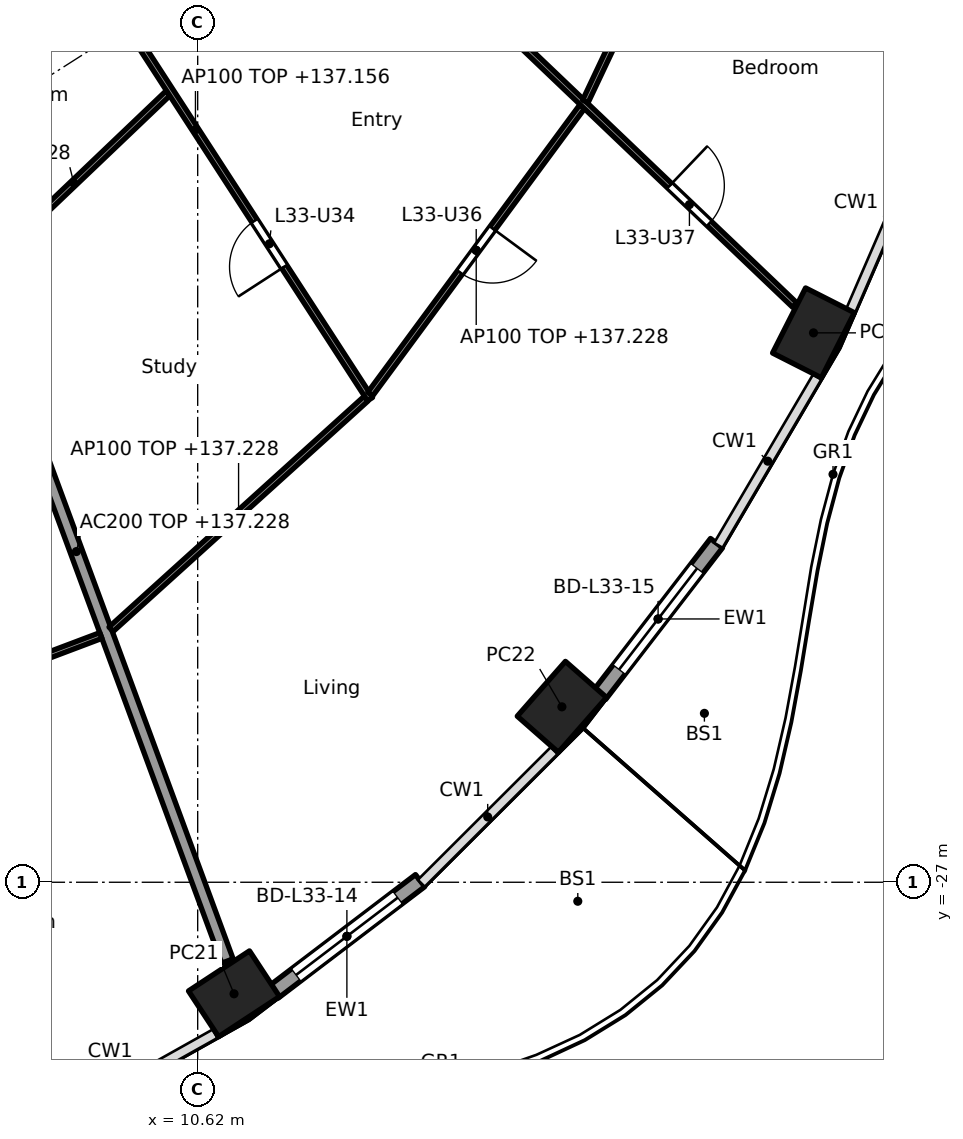
"""IFC4 building model, lengths in metres.
Left out: names, types, materials, properties, quantities, classifications, styles, units other than length and angle.
Written with IfcOpenShell. Run it as: python <this file> out.ifc"""

import sys

from ifc_helpers import new_model, si_unit, direction, frame, frame_2d, origin, origin_2d, place, context, subcontext, project, spatial, rectangle, hollow_rectangle, extrude, element, fill, save


model = new_model("IFC4")
c1 = context("Model", 3, precision=1e-05, world=origin(), true_north=direction((0.0, 1.0)))
c2 = subcontext(c1, "Body", "Model", "MODEL_VIEW")
j1 = project(units=[si_unit("LENGTHUNIT", "METRE"), si_unit("PLANEANGLEUNIT", "RADIAN")], contexts=[c1])
p1 = place(None, origin())
s1 = spatial("IfcSite", under=j1, at=p1, CompositionType="ELEMENT")
p2 = place(p1, origin())
s2 = spatial("IfcBuilding", under=s1, at=p2, CompositionType="ELEMENT")
p3 = place(p2, frame((0.0, 0.0, 134.4)))
s3 = spatial("IfcBuildingStorey", under=s2, at=p3, CompositionType="ELEMENT", Elevation=134.4)
for number, where, z_axis, x_axis in (
    (1, (11.218, -28.834, 0.0), (0.0, 0.0, 1.0), (0.836, 0.549, 0.0)),
    (2, (16.61, -24.115, 0.0), (0.0, 0.0, 1.0), (0.66, 0.751, 0.0)),
    (3, (20.747, -17.965, 0.0), (0.0, 0.0, 1.0), (0.452, 0.892, 0.0)),
):
    element("IfcColumn", number, at=place(p3, frame(where, z_axis=z_axis, x_axis=x_axis)), inside=s3, PredefinedType="COLUMN", context=c2, shape_type="SweptSolid", body=[
        extrude(hollow_rectangle(XDim=1.2, YDim=0.9, WallThickness=0.04, at=origin_2d()), origin(), (0.0, 0.0, 1.0), 3.7),
    ])
p4 = place(p3, frame((14.278, -26.973, 0.0), z_axis=(0.0, 0.0, 1.0), x_axis=(-0.796022231079, -0.605267385233, 0.0)))
e4 = element("IfcWall", 4, at=p4, inside=s3, PredefinedType="SOLIDWALL", context=c2, shape_type="SweptSolid", body=[
    extrude(rectangle(XDim=3.026, YDim=0.25, at=frame_2d((1.513, 0.0))), origin(), (0.0, 0.0, 1.0), 3.44),
])
p5 = place(p4, frame((0.463, 0.0, 0.0)))
e5 = element("IfcOpeningElement", 5, at=p5, cuts=e4, PredefinedType="OPENING", context=c2, shape_type="SweptSolid", body=[
    extrude(rectangle(XDim=2.1, YDim=2.4, at=frame_2d((1.05, 1.2))), frame((0.0, 0.135, 0.0), z_axis=(0.0, -1.0, 0.0), x_axis=(1.0, 0.0, 0.0)), (0.0, 0.0, 1.0), 0.27),
])
p6 = place(p3, frame((19.153, -21.423, 0.0), z_axis=(0.0, 0.0, 1.0), x_axis=(-0.610429847179, -0.792070326217, 0.0)))
e6 = element("IfcWall", 6, at=p6, inside=s3, PredefinedType="SOLIDWALL", context=c2, shape_type="SweptSolid", body=[
    extrude(rectangle(XDim=3.149, YDim=0.25, at=frame_2d((1.575, 0.0))), origin(), (0.0, 0.0, 1.0), 3.44),
])
p7 = place(p6, frame((0.525, 0.0, 0.0)))
e7 = element("IfcOpeningElement", 7, at=p7, cuts=e6, PredefinedType="OPENING", context=c2, shape_type="SweptSolid", body=[
    extrude(rectangle(XDim=2.1, YDim=2.4, at=frame_2d((1.05, 1.2))), frame((0.0, 0.135, 0.0), z_axis=(0.0, -1.0, 0.0), x_axis=(1.0, 0.0, 0.0)), (0.0, 0.0, 1.0), 0.27),
])
p8 = place(p3, frame((6.14, -14.829, 0.0), z_axis=(0.0, 0.0, 1.0), x_axis=(0.346169582481, -0.938171956608, 0.0)))
e8 = element("IfcWall", 8, at=p8, inside=s3, PredefinedType="PARTITIONING", context=c2, shape_type="SweptSolid", body=[
    extrude(rectangle(XDim=14.354, YDim=0.2, at=frame_2d((7.177, 0.0))), origin(), (0.0, 0.0, 1.0), 2.828),
])
p9 = place(p3, frame((4.178, -24.773, 0.0), z_axis=(0.0, 0.0, 1.0), x_axis=(0.935583811437, 0.353104703702, 0.0)))
e9 = element("IfcWall", 9, at=p9, inside=s3, PredefinedType="PARTITIONING", context=c2, shape_type="SweptSolid", body=[
    extrude(rectangle(XDim=5.184, YDim=0.1, at=frame_2d((2.592, 0.0))), origin(), (0.0, 0.0, 1.0), 2.828),
])
p10 = place(p3, frame((7.032, -16.98, 0.0), z_axis=(0.0, 0.0, 1.0), x_axis=(0.723709759148, 0.690104473622, 0.0)))
e10 = element("IfcWall", 10, at=p10, inside=s3, PredefinedType="PARTITIONING", context=c2, shape_type="SweptSolid", body=[
    extrude(rectangle(XDim=4.286, YDim=0.1, at=frame_2d((2.143, 0.0))), origin(), (0.0, 0.0, 1.0), 2.828),
])
p11 = place(p3, frame((9.195, -22.84, 0.0), z_axis=(0.0, 0.0, 1.0), x_axis=(0.741675855479, 0.670758470241, 0.0)))
e11 = element("IfcWall", 11, at=p11, inside=s3, PredefinedType="PARTITIONING", context=c2, shape_type="SweptSolid", body=[
    extrude(rectangle(XDim=5.656, YDim=0.1, at=frame_2d((2.828, 0.0))), origin(), (0.0, 0.0, 1.0), 2.828),
])
p12 = place(p3, frame((7.712, -10.195, 0.0), z_axis=(0.0, 0.0, 1.0), x_axis=(0.543868615753, -0.839170381269, 0.0)))
e12 = element("IfcWall", 12, at=p12, inside=s3, PredefinedType="PARTITIONING", context=c2, shape_type="SweptSolid", body=[
    extrude(rectangle(XDim=10.558, YDim=0.1, at=frame_2d((5.279, 0.0))), origin(), (0.0, 0.0, 1.0), 2.756),
])
p13 = place(p12, frame((1.81, 0.0, 0.0)))
e13 = element("IfcOpeningElement", 13, at=p13, cuts=e12, PredefinedType="OPENING", context=c2, shape_type="SweptSolid", body=[
    extrude(rectangle(XDim=0.9, YDim=2.1, at=frame_2d((0.45, 1.05))), frame((0.0, 0.06, 0.0), z_axis=(0.0, -1.0, 0.0), x_axis=(1.0, 0.0, 0.0)), (0.0, 0.0, 1.0), 0.12),
])
p14 = place(p12, frame((7.064, 0.0, 0.0)))
e14 = element("IfcOpeningElement", 14, at=p14, cuts=e12, PredefinedType="OPENING", context=c2, shape_type="SweptSolid", body=[
    extrude(rectangle(XDim=0.9, YDim=2.1, at=frame_2d((0.45, 1.05))), frame((0.0, 0.06, 0.0), z_axis=(0.0, -1.0, 0.0), x_axis=(1.0, 0.0, 0.0)), (0.0, 0.0, 1.0), 0.12),
])
p15 = place(p3, frame((13.457, -18.973, 0.0), z_axis=(0.0, 0.0, 1.0), x_axis=(0.593532053206, 0.80481035146, 0.0)))
e15 = element("IfcWall", 15, at=p15, inside=s3, PredefinedType="PARTITIONING", context=c2, shape_type="SweptSolid", body=[
    extrude(rectangle(XDim=5.876, YDim=0.1, at=frame_2d((2.938, 0.0))), origin(), (0.0, 0.0, 1.0), 2.828),
])
p16 = place(p15, frame((2.488, 0.0, 0.0)))
e16 = element("IfcOpeningElement", 16, at=p16, cuts=e15, PredefinedType="OPENING", context=c2, shape_type="SweptSolid", body=[
    extrude(rectangle(XDim=0.9, YDim=2.1, at=frame_2d((0.45, 1.05))), frame((0.0, 0.06, 0.0), z_axis=(0.0, -1.0, 0.0), x_axis=(1.0, 0.0, 0.0)), (0.0, 0.0, 1.0), 0.12),
])
p17 = place(p3, frame((10.184, -7.727, 0.0), z_axis=(0.0, 0.0, 1.0), x_axis=(0.723635100101, -0.690182759783, 0.0)))
e17 = element("IfcWall", 17, at=p17, inside=s3, PredefinedType="PARTITIONING", context=c2, shape_type="SweptSolid", body=[
    extrude(rectangle(XDim=14.173, YDim=0.1, at=frame_2d((7.086, 0.0))), origin(), (0.0, 0.0, 1.0), 2.756),
])
p18 = place(p17, frame((1.565, 0.0, 0.0)))
e18 = element("IfcOpeningElement", 18, at=p18, cuts=e17, PredefinedType="OPENING", context=c2, shape_type="SweptSolid", body=[
    extrude(rectangle(XDim=0.9, YDim=2.1, at=frame_2d((0.45, 1.05))), frame((0.0, 0.06, 0.0), z_axis=(0.0, -1.0, 0.0), x_axis=(1.0, 0.0, 0.0)), (0.0, 0.0, 1.0), 0.12),
])
p19 = place(p17, frame((6.257, 0.0, 0.0)))
e19 = element("IfcOpeningElement", 19, at=p19, cuts=e17, PredefinedType="OPENING", context=c2, shape_type="SweptSolid", body=[
    extrude(rectangle(XDim=0.9, YDim=2.1, at=frame_2d((0.45, 1.05))), frame((0.0, 0.06, 0.0), z_axis=(0.0, -1.0, 0.0), x_axis=(1.0, 0.0, 0.0)), (0.0, 0.0, 1.0), 0.12),
])
p20 = place(p17, frame((11.328, 0.0, 0.0)))
e20 = element("IfcOpeningElement", 20, at=p20, cuts=e17, PredefinedType="OPENING", context=c2, shape_type="SweptSolid", body=[
    extrude(rectangle(XDim=0.9, YDim=2.1, at=frame_2d((0.45, 1.05))), frame((0.0, 0.06, 0.0), z_axis=(0.0, -1.0, 0.0), x_axis=(1.0, 0.0, 0.0)), (0.0, 0.0, 1.0), 0.12),
])
p21 = place(p3, frame((16.995, -14.158, 0.0), z_axis=(0.0, 0.0, 1.0), x_axis=(0.427456178439, 0.904036069808, 0.0)))
e21 = element("IfcWall", 21, at=p21, inside=s3, PredefinedType="PARTITIONING", context=c2, shape_type="SweptSolid", body=[
    extrude(rectangle(XDim=6.113, YDim=0.1, at=frame_2d((3.057, 0.0))), origin(), (0.0, 0.0, 1.0), 2.828),
])
p22 = place(p5, origin())
e22 = element("IfcDoor", 22, at=p22, inside=s3, OperationType="SLIDING_TO_LEFT", PredefinedType="DOOR", context=c2, shape_type="SweptSolid", body=[
    extrude(rectangle(XDim=2.1, YDim=2.4, at=frame_2d((1.05, 1.2))), frame((0.0, 0.025, 0.0), z_axis=(0.0, -1.0, 0.0), x_axis=(1.0, 0.0, 0.0)), (0.0, 0.0, 1.0), 0.05),
])
fill(e5, e22)
p23 = place(p7, origin())
e23 = element("IfcDoor", 23, at=p23, inside=s3, OperationType="SLIDING_TO_LEFT", PredefinedType="DOOR", context=c2, shape_type="SweptSolid", body=[
    extrude(rectangle(XDim=2.1, YDim=2.4, at=frame_2d((1.05, 1.2))), frame((0.0, 0.025, 0.0), z_axis=(0.0, -1.0, 0.0), x_axis=(1.0, 0.0, 0.0)), (0.0, 0.0, 1.0), 0.05),
])
fill(e7, e23)
p24 = place(p14, frame((0.9, 0.0, 0.0), x_axis=(-1.0, 0.0, 0.0)))
e24 = element("IfcDoor", 24, at=p24, inside=s3, OperationType="SINGLE_SWING_LEFT", PredefinedType="DOOR", context=c2, shape_type="SweptSolid", body=[
    extrude(rectangle(XDim=0.9, YDim=2.1, at=frame_2d((0.45, 1.05))), frame((0.0, 0.025, 0.0), z_axis=(0.0, -1.0, 0.0), x_axis=(1.0, 0.0, 0.0)), (0.0, 0.0, 1.0), 0.05),
])
fill(e14, e24)
p25 = place(p16, frame((0.9, 0.0, 0.0), x_axis=(-1.0, 0.0, 0.0)))
e25 = element("IfcDoor", 25, at=p25, inside=s3, OperationType="SINGLE_SWING_LEFT", PredefinedType="DOOR", context=c2, shape_type="SweptSolid", body=[
    extrude(rectangle(XDim=0.9, YDim=2.1, at=frame_2d((0.45, 1.05))), frame((0.0, 0.025, 0.0), z_axis=(0.0, -1.0, 0.0), x_axis=(1.0, 0.0, 0.0)), (0.0, 0.0, 1.0), 0.05),
])
fill(e16, e25)
p26 = place(p20, origin())
e26 = element("IfcDoor", 26, at=p26, inside=s3, OperationType="SINGLE_SWING_LEFT", PredefinedType="DOOR", context=c2, shape_type="SweptSolid", body=[
    extrude(rectangle(XDim=0.9, YDim=2.1, at=frame_2d((0.45, 1.05))), frame((0.0, 0.025, 0.0), z_axis=(0.0, -1.0, 0.0), x_axis=(1.0, 0.0, 0.0)), (0.0, 0.0, 1.0), 0.05),
])
fill(e20, e26)
save(model, sys.argv[1])
